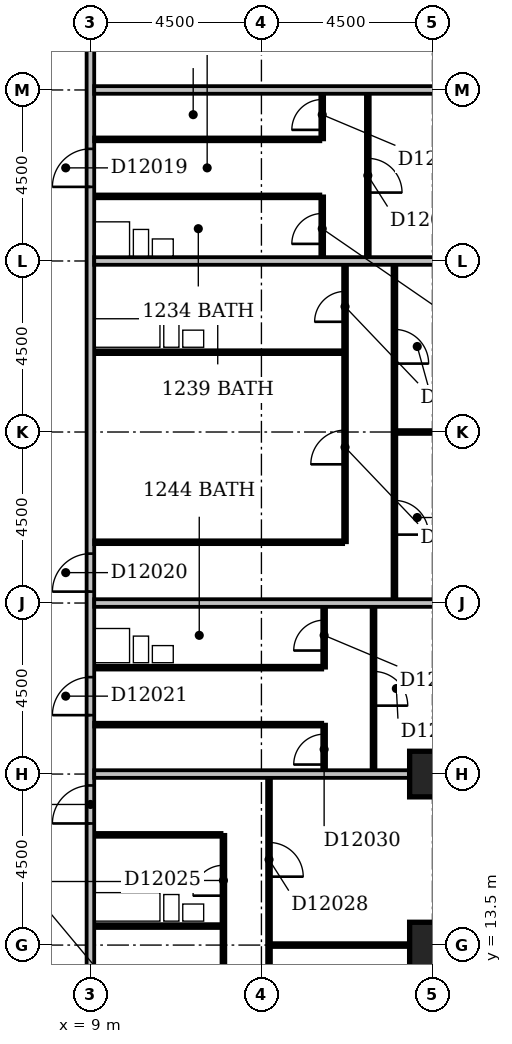
"""IFC4 building model, lengths in metres.
Left out: names, types, materials, properties, quantities, classifications, styles, units other than length and angle.
Written with IfcOpenShell. Run it as: python <this file> out.ifc"""

import sys

from ifc_helpers import new_model, si_unit, direction, frame, frame_2d, origin, origin_2d, place, context, subcontext, project, spatial, rectangle, extrude, element, fill, save


model = new_model("IFC4")
c1 = context("Model", 3, precision=1e-05, world=origin(), true_north=direction((0.0, 1.0)))
c2 = subcontext(c1, "Body", "Model", "MODEL_VIEW")
j1 = project(units=[si_unit("LENGTHUNIT", "METRE"), si_unit("PLANEANGLEUNIT", "RADIAN")], contexts=[c1])
p1 = place(None, origin())
s1 = spatial("IfcSite", under=j1, at=p1, CompositionType="ELEMENT")
p2 = place(p1, origin())
s2 = spatial("IfcBuilding", under=s1, at=p2, CompositionType="ELEMENT")
p3 = place(p2, frame((0.0, 0.0, 54.2)))
s3 = spatial("IfcBuildingStorey", under=s2, at=p3, CompositionType="ELEMENT", Elevation=54.2)
for number, where, z_axis, x_axis in (
    (1, (18.0, 13.5, -0.3), (0.0, 0.0, 1.0), (1.0, 0.0, 0.0)),
    (2, (18.0, 18.0, -0.3), (0.0, 0.0, 1.0), (1.0, 0.0, 0.0)),
):
    element("IfcColumn", number, at=place(p3, frame(where, z_axis=z_axis, x_axis=x_axis)), inside=s3, PredefinedType="COLUMN", context=c2, shape_type="SweptSolid", body=[
        extrude(rectangle(XDim=1.2, YDim=1.2, at=origin_2d()), origin(), (0.0, 0.0, 1.0), 3.6),
    ])
p4 = place(p3, frame((9.0, 5.0, 0.0), z_axis=(0.0, 0.0, 1.0), x_axis=(0.0, 1.0, 0.0)))
e3 = element("IfcWall", 3, at=p4, inside=s3, PredefinedType="PARTITIONING", context=c2, shape_type="SweptSolid", body=[
    extrude(rectangle(XDim=44.5, YDim=0.2, at=frame_2d((22.25, 0.0))), origin(), (0.0, 0.0, 1.0), 3.3),
])
p5 = place(p4, frame((28.45, 0.0, 0.0)))
e4 = element("IfcOpeningElement", 4, at=p5, cuts=e3, PredefinedType="OPENING", context=c2, shape_type="SweptSolid", body=[
    extrude(rectangle(XDim=1.0, YDim=2.1, at=frame_2d((0.5, 1.05))), frame((0.0, 0.112, 0.0), z_axis=(0.0, -1.0, 0.0), x_axis=(1.0, 0.0, 0.0)), (0.0, 0.0, 1.0), 0.224),
])
p6 = place(p4, frame((17.8, 0.0, 0.0)))
e5 = element("IfcOpeningElement", 5, at=p6, cuts=e3, PredefinedType="OPENING", context=c2, shape_type="SweptSolid", body=[
    extrude(rectangle(XDim=1.0, YDim=2.1, at=frame_2d((0.5, 1.05))), frame((0.0, 0.112, 0.0), z_axis=(0.0, -1.0, 0.0), x_axis=(1.0, 0.0, 0.0)), (0.0, 0.0, 1.0), 0.224),
])
p7 = place(p4, frame((14.55, 0.0, 0.0)))
e6 = element("IfcOpeningElement", 6, at=p7, cuts=e3, PredefinedType="OPENING", context=c2, shape_type="SweptSolid", body=[
    extrude(rectangle(XDim=1.0, YDim=2.1, at=frame_2d((0.5, 1.05))), frame((0.0, 0.112, 0.0), z_axis=(0.0, -1.0, 0.0), x_axis=(1.0, 0.0, 0.0)), (0.0, 0.0, 1.0), 0.224),
])
p8 = place(p4, frame((11.7, 0.0, 0.0)))
e7 = element("IfcOpeningElement", 7, at=p8, cuts=e3, PredefinedType="OPENING", context=c2, shape_type="SweptSolid", body=[
    extrude(rectangle(XDim=1.0, YDim=2.1, at=frame_2d((0.5, 1.05))), frame((0.0, 0.112, 0.0), z_axis=(0.0, -1.0, 0.0), x_axis=(1.0, 0.0, 0.0)), (0.0, 0.0, 1.0), 0.224),
])
p9 = place(p4, frame((35.0, 0.0, 0.0)))
e8 = element("IfcOpeningElement", 8, at=p9, cuts=e3, PredefinedType="OPENING", context=c2, shape_type="SweptSolid", body=[
    extrude(rectangle(XDim=0.9, YDim=2.1, at=frame_2d((0.45, 1.05))), frame((0.0, 0.112, 0.0), z_axis=(0.0, -1.0, 0.0), x_axis=(1.0, 0.0, 0.0)), (0.0, 0.0, 1.0), 0.224),
])
p10 = place(p4, frame((1.5, 0.0, 0.0)))
e9 = element("IfcOpeningElement", 9, at=p10, cuts=e3, PredefinedType="OPENING", context=c2, shape_type="SweptSolid", body=[
    extrude(rectangle(XDim=0.9, YDim=2.1, at=frame_2d((0.45, 1.05))), frame((0.0, 0.112, 0.0), z_axis=(0.0, -1.0, 0.0), x_axis=(1.0, 0.0, 0.0)), (0.0, 0.0, 1.0), 0.224),
])
p11 = place(p3, frame((12.5, 9.1, 0.0), z_axis=(0.0, 0.0, 1.0), x_axis=(0.0, 1.0, 0.0)))
e10 = element("IfcWall", 10, at=p11, inside=s3, PredefinedType="PARTITIONING", context=c2, shape_type="SweptSolid", body=[
    extrude(rectangle(XDim=7.3, YDim=0.1, at=frame_2d((3.65, 0.0))), origin(), (0.0, 0.0, 1.0), 3.3),
])
p12 = place(p11, frame((5.7, 0.0, 0.0)))
e11 = element("IfcOpeningElement", 11, at=p12, cuts=e10, PredefinedType="OPENING", context=c2, shape_type="SweptSolid", body=[
    extrude(rectangle(XDim=0.8, YDim=2.1, at=frame_2d((0.4, 1.05))), frame((0.0, 0.062, 0.0), z_axis=(0.0, -1.0, 0.0), x_axis=(1.0, 0.0, 0.0)), (0.0, 0.0, 1.0), 0.124),
])
p13 = place(p11, frame((1.95, 0.0, 0.0)))
e12 = element("IfcOpeningElement", 12, at=p13, cuts=e10, PredefinedType="OPENING", context=c2, shape_type="SweptSolid", body=[
    extrude(rectangle(XDim=0.9, YDim=2.1, at=frame_2d((0.45, 1.05))), frame((0.0, 0.062, 0.0), z_axis=(0.0, -1.0, 0.0), x_axis=(1.0, 0.0, 0.0)), (0.0, 0.0, 1.0), 0.124),
])
p14 = place(p3, frame((13.7, 9.6, 0.0), z_axis=(0.0, 0.0, 1.0), x_axis=(0.0, 1.0, 0.0)))
e13 = element("IfcWall", 13, at=p14, inside=s3, PredefinedType="PARTITIONING", context=c2, shape_type="SweptSolid", body=[
    extrude(rectangle(XDim=8.3, YDim=0.1, at=frame_2d((4.15, 0.0))), origin(), (0.0, 0.0, 1.0), 3.3),
])
p15 = place(p14, frame((1.2, 0.0, 0.0)))
e14 = element("IfcOpeningElement", 14, at=p15, cuts=e13, PredefinedType="OPENING", context=c2, shape_type="SweptSolid", body=[
    extrude(rectangle(XDim=0.9, YDim=2.1, at=frame_2d((0.45, 1.05))), frame((0.0, 0.062, 0.0), z_axis=(0.0, -1.0, 0.0), x_axis=(1.0, 0.0, 0.0)), (0.0, 0.0, 1.0), 0.124),
])
p16 = place(p14, frame((5.7, 0.0, 0.0)))
e15 = element("IfcOpeningElement", 15, at=p16, cuts=e13, PredefinedType="OPENING", context=c2, shape_type="SweptSolid", body=[
    extrude(rectangle(XDim=0.9, YDim=2.1, at=frame_2d((0.45, 1.05))), frame((0.0, 0.062, 0.0), z_axis=(0.0, -1.0, 0.0), x_axis=(1.0, 0.0, 0.0)), (0.0, 0.0, 1.0), 0.124),
])
p17 = place(p3, frame((13.75, 13.5, 0.0), z_axis=(0.0, 0.0, 1.0), x_axis=(1.0, 0.0, 0.0)))
e16 = element("IfcWall", 16, at=p17, inside=s3, PredefinedType="PARTITIONING", context=c2, shape_type="SweptSolid", body=[
    extrude(rectangle(XDim=3.65, YDim=0.1, at=frame_2d((1.825, 0.0))), origin(), (0.0, 0.0, 1.0), 3.3),
])
for number, where, z_axis, x_axis in (
    (17, (9.1, 14.0, 0.0), (0.0, 0.0, 1.0), (1.0, 0.0, 0.0)),
    (18, (9.1, 16.4, 0.0), (0.0, 0.0, 1.0), (1.0, 0.0, 0.0)),
):
    element("IfcWall", number, at=place(p3, frame(where, z_axis=z_axis, x_axis=x_axis)), inside=s3, PredefinedType="PLUMBINGWALL", context=c2, shape_type="SweptSolid", body=[
        extrude(rectangle(XDim=3.35, YDim=0.1, at=frame_2d((1.675, 0.0))), origin(), (0.0, 0.0, 1.0), 3.3),
    ])
p18 = place(p3, frame((9.1, 18.0, 0.0), z_axis=(0.0, 0.0, 1.0), x_axis=(1.0, 0.0, 0.0)))
e19 = element("IfcWall", 19, at=p18, inside=s3, PredefinedType="PARTITIONING", context=c2, shape_type="SweptSolid", body=[
    extrude(rectangle(XDim=8.3, YDim=0.2, at=frame_2d((4.15, 0.0))), origin(), (0.0, 0.0, 1.0), 2.6),
])
p19 = place(p3, frame((15.15, 18.1, 0.0), z_axis=(0.0, 0.0, 1.0), x_axis=(0.0, 1.0, 0.0)))
e20 = element("IfcWall", 20, at=p19, inside=s3, PredefinedType="PARTITIONING", context=c2, shape_type="SweptSolid", body=[
    extrude(rectangle(XDim=1.2, YDim=0.1, at=frame_2d((0.6, 0.0))), origin(), (0.0, 0.0, 1.0), 3.3),
])
p20 = place(p19, frame((0.15, 0.0, 0.0)))
e21 = element("IfcOpeningElement", 21, at=p20, cuts=e20, PredefinedType="OPENING", context=c2, shape_type="SweptSolid", body=[
    extrude(rectangle(XDim=0.8, YDim=2.1, at=frame_2d((0.4, 1.05))), frame((0.0, 0.062, 0.0), z_axis=(0.0, -1.0, 0.0), x_axis=(1.0, 0.0, 0.0)), (0.0, 0.0, 1.0), 0.124),
])
p21 = place(p3, frame((16.45, 18.1, 0.0), z_axis=(0.0, 0.0, 1.0), x_axis=(0.0, 1.0, 0.0)))
e22 = element("IfcWall", 22, at=p21, inside=s3, PredefinedType="PARTITIONING", context=c2, shape_type="SweptSolid", body=[
    extrude(rectangle(XDim=4.3, YDim=0.1, at=frame_2d((2.15, 0.0))), origin(), (0.0, 0.0, 1.0), 3.3),
])
p22 = place(p21, frame((1.7, 0.0, 0.0)))
e23 = element("IfcOpeningElement", 23, at=p22, cuts=e22, PredefinedType="OPENING", context=c2, shape_type="SweptSolid", body=[
    extrude(rectangle(XDim=0.9, YDim=2.1, at=frame_2d((0.45, 1.05))), frame((0.0, 0.062, 0.0), z_axis=(0.0, -1.0, 0.0), x_axis=(1.0, 0.0, 0.0)), (0.0, 0.0, 1.0), 0.124),
])
p23 = place(p3, frame((9.1, 19.3, 0.0), z_axis=(0.0, 0.0, 1.0), x_axis=(1.0, 0.0, 0.0)))
e24 = element("IfcWall", 24, at=p23, inside=s3, PredefinedType="PARTITIONING", context=c2, shape_type="SweptSolid", body=[
    extrude(rectangle(XDim=6.0, YDim=0.1, at=frame_2d((3.0, 0.0))), origin(), (0.0, 0.0, 1.0), 3.3),
])
p24 = place(p3, frame((9.1, 20.8, 0.0), z_axis=(0.0, 0.0, 1.0), x_axis=(1.0, 0.0, 0.0)))
e25 = element("IfcWall", 25, at=p24, inside=s3, PredefinedType="PLUMBINGWALL", context=c2, shape_type="SweptSolid", body=[
    extrude(rectangle(XDim=6.0, YDim=0.1, at=frame_2d((3.0, 0.0))), origin(), (0.0, 0.0, 1.0), 3.3),
])
p25 = place(p3, frame((15.15, 20.8, 0.0), z_axis=(0.0, 0.0, 1.0), x_axis=(0.0, 1.0, 0.0)))
e26 = element("IfcWall", 26, at=p25, inside=s3, PredefinedType="PARTITIONING", context=c2, shape_type="SweptSolid", body=[
    extrude(rectangle(XDim=1.6, YDim=0.1, at=frame_2d((0.8, 0.0))), origin(), (0.0, 0.0, 1.0), 3.3),
])
p26 = place(p25, frame((0.45, 0.0, 0.0)))
e27 = element("IfcOpeningElement", 27, at=p26, cuts=e26, PredefinedType="OPENING", context=c2, shape_type="SweptSolid", body=[
    extrude(rectangle(XDim=0.8, YDim=2.1, at=frame_2d((0.4, 1.05))), frame((0.0, 0.062, 0.0), z_axis=(0.0, -1.0, 0.0), x_axis=(1.0, 0.0, 0.0)), (0.0, 0.0, 1.0), 0.124),
])
p27 = place(p3, frame((9.1, 22.5, 0.0), z_axis=(0.0, 0.0, 1.0), x_axis=(1.0, 0.0, 0.0)))
e28 = element("IfcWall", 28, at=p27, inside=s3, PredefinedType="PARTITIONING", context=c2, shape_type="SweptSolid", body=[
    extrude(rectangle(XDim=12.8, YDim=0.2, at=frame_2d((6.4, 0.0))), origin(), (0.0, 0.0, 1.0), 3.3),
])
p28 = place(p3, frame((17.0, 22.6, 0.0), z_axis=(0.0, 0.0, 1.0), x_axis=(0.0, 1.0, 0.0)))
e29 = element("IfcWall", 29, at=p28, inside=s3, PredefinedType="PARTITIONING", context=c2, shape_type="SweptSolid", body=[
    extrude(rectangle(XDim=8.8, YDim=0.1, at=frame_2d((4.4, 0.0))), origin(), (0.0, 0.0, 1.0), 3.3),
])
p29 = place(p28, frame((1.7, 0.0, 0.0)))
e30 = element("IfcOpeningElement", 30, at=p29, cuts=e29, PredefinedType="OPENING", context=c2, shape_type="SweptSolid", body=[
    extrude(rectangle(XDim=0.9, YDim=2.1, at=frame_2d((0.45, 1.05))), frame((0.0, 0.062, 0.0), z_axis=(0.0, -1.0, 0.0), x_axis=(1.0, 0.0, 0.0)), (0.0, 0.0, 1.0), 0.124),
])
p30 = place(p28, frame((6.2, 0.0, 0.0)))
e31 = element("IfcOpeningElement", 31, at=p30, cuts=e29, PredefinedType="OPENING", context=c2, shape_type="SweptSolid", body=[
    extrude(rectangle(XDim=0.9, YDim=2.1, at=frame_2d((0.45, 1.05))), frame((0.0, 0.062, 0.0), z_axis=(0.0, -1.0, 0.0), x_axis=(1.0, 0.0, 0.0)), (0.0, 0.0, 1.0), 0.124),
])
p31 = place(p3, frame((9.1, 24.1, 0.0), z_axis=(0.0, 0.0, 1.0), x_axis=(1.0, 0.0, 0.0)))
e32 = element("IfcWall", 32, at=p31, inside=s3, PredefinedType="PARTITIONING", context=c2, shape_type="SweptSolid", body=[
    extrude(rectangle(XDim=6.55, YDim=0.1, at=frame_2d((3.275, 0.0))), origin(), (0.0, 0.0, 1.0), 3.3),
])
p32 = place(p3, frame((15.7, 24.1, 0.0), z_axis=(0.0, 0.0, 1.0), x_axis=(0.0, 1.0, 0.0)))
e33 = element("IfcWall", 33, at=p32, inside=s3, PredefinedType="PARTITIONING", context=c2, shape_type="SweptSolid", body=[
    extrude(rectangle(XDim=7.3, YDim=0.1, at=frame_2d((3.65, 0.0))), origin(), (0.0, 0.0, 1.0), 3.3),
])
p33 = place(p32, frame((5.8, 0.0, 0.0)))
e34 = element("IfcOpeningElement", 34, at=p33, cuts=e33, PredefinedType="OPENING", context=c2, shape_type="SweptSolid", body=[
    extrude(rectangle(XDim=0.8, YDim=2.1, at=frame_2d((0.4, 1.05))), frame((0.0, 0.062, 0.0), z_axis=(0.0, -1.0, 0.0), x_axis=(1.0, 0.0, 0.0)), (0.0, 0.0, 1.0), 0.124),
])
p34 = place(p32, frame((2.05, 0.0, 0.0)))
e35 = element("IfcOpeningElement", 35, at=p34, cuts=e33, PredefinedType="OPENING", context=c2, shape_type="SweptSolid", body=[
    extrude(rectangle(XDim=0.9, YDim=2.1, at=frame_2d((0.45, 1.05))), frame((0.0, 0.062, 0.0), z_axis=(0.0, -1.0, 0.0), x_axis=(1.0, 0.0, 0.0)), (0.0, 0.0, 1.0), 0.124),
])
p35 = place(p3, frame((17.05, 27.0, 0.0), z_axis=(0.0, 0.0, 1.0), x_axis=(1.0, 0.0, 0.0)))
e36 = element("IfcWall", 36, at=p35, inside=s3, PredefinedType="PARTITIONING", context=c2, shape_type="SweptSolid", body=[
    extrude(rectangle(XDim=4.85, YDim=0.1, at=frame_2d((2.425, 0.0))), origin(), (0.0, 0.0, 1.0), 2.7),
])
p36 = place(p3, frame((9.1, 29.1, 0.0), z_axis=(0.0, 0.0, 1.0), x_axis=(1.0, 0.0, 0.0)))
e37 = element("IfcWall", 37, at=p36, inside=s3, PredefinedType="PLUMBINGWALL", context=c2, shape_type="SweptSolid", body=[
    extrude(rectangle(XDim=6.55, YDim=0.1, at=frame_2d((3.275, 0.0))), origin(), (0.0, 0.0, 1.0), 3.3),
])
p37 = place(p3, frame((9.1, 31.5, 0.0), z_axis=(0.0, 0.0, 1.0), x_axis=(1.0, 0.0, 0.0)))
e38 = element("IfcWall", 38, at=p37, inside=s3, PredefinedType="PARTITIONING", context=c2, shape_type="SweptSolid", body=[
    extrude(rectangle(XDim=12.8, YDim=0.2, at=frame_2d((6.4, 0.0))), origin(), (0.0, 0.0, 1.0), 3.3),
])
p38 = place(p3, frame((15.1, 31.6, 0.0), z_axis=(0.0, 0.0, 1.0), x_axis=(0.0, 1.0, 0.0)))
e39 = element("IfcWall", 39, at=p38, inside=s3, PredefinedType="PARTITIONING", context=c2, shape_type="SweptSolid", body=[
    extrude(rectangle(XDim=1.6, YDim=0.1, at=frame_2d((0.8, 0.0))), origin(), (0.0, 0.0, 1.0), 3.3),
])
p39 = place(p38, frame((0.35, 0.0, 0.0)))
e40 = element("IfcOpeningElement", 40, at=p39, cuts=e39, PredefinedType="OPENING", context=c2, shape_type="SweptSolid", body=[
    extrude(rectangle(XDim=0.8, YDim=2.1, at=frame_2d((0.4, 1.05))), frame((0.0, 0.062, 0.0), z_axis=(0.0, -1.0, 0.0), x_axis=(1.0, 0.0, 0.0)), (0.0, 0.0, 1.0), 0.124),
])
p40 = place(p3, frame((16.3, 31.6, 0.0), z_axis=(0.0, 0.0, 1.0), x_axis=(0.0, 1.0, 0.0)))
e41 = element("IfcWall", 41, at=p40, inside=s3, PredefinedType="PARTITIONING", context=c2, shape_type="SweptSolid", body=[
    extrude(rectangle(XDim=4.3, YDim=0.1, at=frame_2d((2.15, 0.0))), origin(), (0.0, 0.0, 1.0), 3.3),
])
p41 = place(p40, frame((1.7, 0.0, 0.0)))
e42 = element("IfcOpeningElement", 42, at=p41, cuts=e41, PredefinedType="OPENING", context=c2, shape_type="SweptSolid", body=[
    extrude(rectangle(XDim=0.9, YDim=2.1, at=frame_2d((0.45, 1.05))), frame((0.0, 0.062, 0.0), z_axis=(0.0, -1.0, 0.0), x_axis=(1.0, 0.0, 0.0)), (0.0, 0.0, 1.0), 0.124),
])
p42 = place(p3, frame((9.1, 33.2, 0.0), z_axis=(0.0, 0.0, 1.0), x_axis=(1.0, 0.0, 0.0)))
e43 = element("IfcWall", 43, at=p42, inside=s3, PredefinedType="PLUMBINGWALL", context=c2, shape_type="SweptSolid", body=[
    extrude(rectangle(XDim=5.95, YDim=0.1, at=frame_2d((2.975, 0.0))), origin(), (0.0, 0.0, 1.0), 3.3),
])
p43 = place(p3, frame((9.1, 34.7, 0.0), z_axis=(0.0, 0.0, 1.0), x_axis=(1.0, 0.0, 0.0)))
e44 = element("IfcWall", 44, at=p43, inside=s3, PredefinedType="PARTITIONING", context=c2, shape_type="SweptSolid", body=[
    extrude(rectangle(XDim=5.95, YDim=0.1, at=frame_2d((2.975, 0.0))), origin(), (0.0, 0.0, 1.0), 3.3),
])
p44 = place(p3, frame((15.1, 34.7, 0.0), z_axis=(0.0, 0.0, 1.0), x_axis=(0.0, 1.0, 0.0)))
e45 = element("IfcWall", 45, at=p44, inside=s3, PredefinedType="PARTITIONING", context=c2, shape_type="SweptSolid", body=[
    extrude(rectangle(XDim=1.2, YDim=0.1, at=frame_2d((0.6, 0.0))), origin(), (0.0, 0.0, 1.0), 3.3),
])
p45 = place(p44, frame((0.25, 0.0, 0.0)))
e46 = element("IfcOpeningElement", 46, at=p45, cuts=e45, PredefinedType="OPENING", context=c2, shape_type="SweptSolid", body=[
    extrude(rectangle(XDim=0.8, YDim=2.1, at=frame_2d((0.4, 1.05))), frame((0.0, 0.062, 0.0), z_axis=(0.0, -1.0, 0.0), x_axis=(1.0, 0.0, 0.0)), (0.0, 0.0, 1.0), 0.124),
])
p46 = place(p3, frame((9.1, 36.0, 0.0), z_axis=(0.0, 0.0, 1.0), x_axis=(1.0, 0.0, 0.0)))
e47 = element("IfcWall", 47, at=p46, inside=s3, PredefinedType="PARTITIONING", context=c2, shape_type="SweptSolid", body=[
    extrude(rectangle(XDim=12.8, YDim=0.2, at=frame_2d((6.4, 0.0))), origin(), (0.0, 0.0, 1.0), 2.4),
])
p47 = place(p5, origin())
e48 = element("IfcDoor", 48, at=p47, inside=s3, OperationType="SINGLE_SWING_LEFT", PredefinedType="DOOR", context=c2, shape_type="SweptSolid", body=[
    extrude(rectangle(XDim=1.0, YDim=2.1, at=frame_2d((0.5, 1.05))), frame((0.0, 0.025, 0.0), z_axis=(0.0, -1.0, 0.0), x_axis=(1.0, 0.0, 0.0)), (0.0, 0.0, 1.0), 0.05),
])
fill(e4, e48)
p48 = place(p6, origin())
e49 = element("IfcDoor", 49, at=p48, inside=s3, OperationType="SINGLE_SWING_LEFT", PredefinedType="DOOR", context=c2, shape_type="SweptSolid", body=[
    extrude(rectangle(XDim=1.0, YDim=2.1, at=frame_2d((0.5, 1.05))), frame((0.0, 0.025, 0.0), z_axis=(0.0, -1.0, 0.0), x_axis=(1.0, 0.0, 0.0)), (0.0, 0.0, 1.0), 0.05),
])
fill(e5, e49)
p49 = place(p7, origin())
e50 = element("IfcDoor", 50, at=p49, inside=s3, OperationType="SINGLE_SWING_LEFT", PredefinedType="DOOR", context=c2, shape_type="SweptSolid", body=[
    extrude(rectangle(XDim=1.0, YDim=2.1, at=frame_2d((0.5, 1.05))), frame((0.0, 0.025, 0.0), z_axis=(0.0, -1.0, 0.0), x_axis=(1.0, 0.0, 0.0)), (0.0, 0.0, 1.0), 0.05),
])
fill(e6, e50)
p50 = place(p8, origin())
e51 = element("IfcDoor", 51, at=p50, inside=s3, OperationType="SINGLE_SWING_LEFT", PredefinedType="DOOR", context=c2, shape_type="SweptSolid", body=[
    extrude(rectangle(XDim=1.0, YDim=2.1, at=frame_2d((0.5, 1.05))), frame((0.0, 0.025, 0.0), z_axis=(0.0, -1.0, 0.0), x_axis=(1.0, 0.0, 0.0)), (0.0, 0.0, 1.0), 0.05),
])
fill(e7, e51)
p51 = place(p12, origin())
e52 = element("IfcDoor", 52, at=p51, inside=s3, OperationType="SINGLE_SWING_LEFT", PredefinedType="DOOR", context=c2, shape_type="SweptSolid", body=[
    extrude(rectangle(XDim=0.8, YDim=2.1, at=frame_2d((0.4, 1.05))), frame((0.0, 0.025, 0.0), z_axis=(0.0, -1.0, 0.0), x_axis=(1.0, 0.0, 0.0)), (0.0, 0.0, 1.0), 0.05),
])
fill(e11, e52)
p52 = place(p16, frame((0.9, 0.0, 0.0), z_axis=(0.0, 0.0, 1.0), x_axis=(-1.0, 0.0, 0.0)))
e53 = element("IfcDoor", 53, at=p52, inside=s3, OperationType="SINGLE_SWING_RIGHT", PredefinedType="DOOR", context=c2, shape_type="SweptSolid", body=[
    extrude(rectangle(XDim=0.9, YDim=2.1, at=frame_2d((0.45, 1.05))), frame((0.0, 0.025, 0.0), z_axis=(0.0, -1.0, 0.0), x_axis=(1.0, 0.0, 0.0)), (0.0, 0.0, 1.0), 0.05),
])
fill(e15, e53)
p53 = place(p20, origin())
e54 = element("IfcDoor", 54, at=p53, inside=s3, OperationType="SINGLE_SWING_LEFT", PredefinedType="DOOR", context=c2, shape_type="SweptSolid", body=[
    extrude(rectangle(XDim=0.8, YDim=2.1, at=frame_2d((0.4, 1.05))), frame((0.0, 0.025, 0.0), z_axis=(0.0, -1.0, 0.0), x_axis=(1.0, 0.0, 0.0)), (0.0, 0.0, 1.0), 0.05),
])
fill(e21, e54)
p54 = place(p22, frame((0.9, 0.0, 0.0), z_axis=(0.0, 0.0, 1.0), x_axis=(-1.0, 0.0, 0.0)))
e55 = element("IfcDoor", 55, at=p54, inside=s3, OperationType="SINGLE_SWING_RIGHT", PredefinedType="DOOR", context=c2, shape_type="SweptSolid", body=[
    extrude(rectangle(XDim=0.9, YDim=2.1, at=frame_2d((0.45, 1.05))), frame((0.0, 0.025, 0.0), z_axis=(0.0, -1.0, 0.0), x_axis=(1.0, 0.0, 0.0)), (0.0, 0.0, 1.0), 0.05),
])
fill(e23, e55)
p55 = place(p26, origin())
e56 = element("IfcDoor", 56, at=p55, inside=s3, OperationType="SINGLE_SWING_LEFT", PredefinedType="DOOR", context=c2, shape_type="SweptSolid", body=[
    extrude(rectangle(XDim=0.8, YDim=2.1, at=frame_2d((0.4, 1.05))), frame((0.0, 0.025, 0.0), z_axis=(0.0, -1.0, 0.0), x_axis=(1.0, 0.0, 0.0)), (0.0, 0.0, 1.0), 0.05),
])
fill(e27, e56)
p56 = place(p29, frame((0.9, 0.0, 0.0), z_axis=(0.0, 0.0, 1.0), x_axis=(-1.0, 0.0, 0.0)))
e57 = element("IfcDoor", 57, at=p56, inside=s3, OperationType="SINGLE_SWING_RIGHT", PredefinedType="DOOR", context=c2, shape_type="SweptSolid", body=[
    extrude(rectangle(XDim=0.9, YDim=2.1, at=frame_2d((0.45, 1.05))), frame((0.0, 0.025, 0.0), z_axis=(0.0, -1.0, 0.0), x_axis=(1.0, 0.0, 0.0)), (0.0, 0.0, 1.0), 0.05),
])
fill(e30, e57)
p57 = place(p30, frame((0.9, 0.0, 0.0), z_axis=(0.0, 0.0, 1.0), x_axis=(-1.0, 0.0, 0.0)))
e58 = element("IfcDoor", 58, at=p57, inside=s3, OperationType="SINGLE_SWING_RIGHT", PredefinedType="DOOR", context=c2, shape_type="SweptSolid", body=[
    extrude(rectangle(XDim=0.9, YDim=2.1, at=frame_2d((0.45, 1.05))), frame((0.0, 0.025, 0.0), z_axis=(0.0, -1.0, 0.0), x_axis=(1.0, 0.0, 0.0)), (0.0, 0.0, 1.0), 0.05),
])
fill(e31, e58)
p58 = place(p33, origin())
e59 = element("IfcDoor", 59, at=p58, inside=s3, OperationType="SINGLE_SWING_LEFT", PredefinedType="DOOR", context=c2, shape_type="SweptSolid", body=[
    extrude(rectangle(XDim=0.8, YDim=2.1, at=frame_2d((0.4, 1.05))), frame((0.0, 0.025, 0.0), z_axis=(0.0, -1.0, 0.0), x_axis=(1.0, 0.0, 0.0)), (0.0, 0.0, 1.0), 0.05),
])
fill(e34, e59)
p59 = place(p34, origin())
e60 = element("IfcDoor", 60, at=p59, inside=s3, OperationType="SINGLE_SWING_LEFT", PredefinedType="DOOR", context=c2, shape_type="SweptSolid", body=[
    extrude(rectangle(XDim=0.9, YDim=2.1, at=frame_2d((0.45, 1.05))), frame((0.0, 0.025, 0.0), z_axis=(0.0, -1.0, 0.0), x_axis=(1.0, 0.0, 0.0)), (0.0, 0.0, 1.0), 0.05),
])
fill(e35, e60)
p60 = place(p39, origin())
e61 = element("IfcDoor", 61, at=p60, inside=s3, OperationType="SINGLE_SWING_LEFT", PredefinedType="DOOR", context=c2, shape_type="SweptSolid", body=[
    extrude(rectangle(XDim=0.8, YDim=2.1, at=frame_2d((0.4, 1.05))), frame((0.0, 0.025, 0.0), z_axis=(0.0, -1.0, 0.0), x_axis=(1.0, 0.0, 0.0)), (0.0, 0.0, 1.0), 0.05),
])
fill(e40, e61)
p61 = place(p41, frame((0.9, 0.0, 0.0), z_axis=(0.0, 0.0, 1.0), x_axis=(-1.0, 0.0, 0.0)))
e62 = element("IfcDoor", 62, at=p61, inside=s3, OperationType="SINGLE_SWING_RIGHT", PredefinedType="DOOR", context=c2, shape_type="SweptSolid", body=[
    extrude(rectangle(XDim=0.9, YDim=2.1, at=frame_2d((0.45, 1.05))), frame((0.0, 0.025, 0.0), z_axis=(0.0, -1.0, 0.0), x_axis=(1.0, 0.0, 0.0)), (0.0, 0.0, 1.0), 0.05),
])
fill(e42, e62)
p62 = place(p45, origin())
e63 = element("IfcDoor", 63, at=p62, inside=s3, OperationType="SINGLE_SWING_LEFT", PredefinedType="DOOR", context=c2, shape_type="SweptSolid", body=[
    extrude(rectangle(XDim=0.8, YDim=2.1, at=frame_2d((0.4, 1.05))), frame((0.0, 0.025, 0.0), z_axis=(0.0, -1.0, 0.0), x_axis=(1.0, 0.0, 0.0)), (0.0, 0.0, 1.0), 0.05),
])
fill(e46, e63)
save(model, sys.argv[1])
